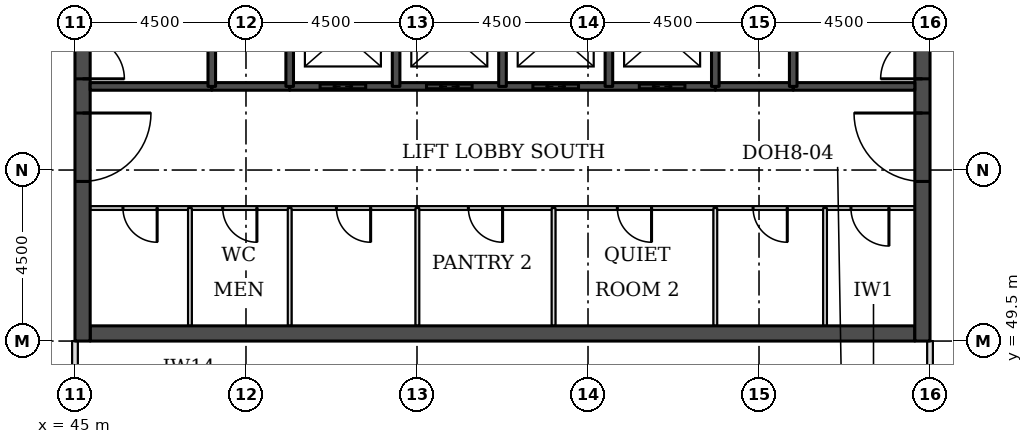
"""IFC4 building model, lengths in metres.
Left out: names, types, materials, properties, quantities, classifications, styles, units other than length and angle.
Written with IfcOpenShell. Run it as: python <this file> out.ifc"""

import sys

from ifc_helpers import new_model, si_unit, direction, frame, frame_2d, origin, place, context, subcontext, project, spatial, rectangle, extrude, element, fill, save


model = new_model("IFC4")
c1 = context("Model", 3, precision=1e-05, world=origin(), true_north=direction((0.0, 1.0)))
c2 = subcontext(c1, "Body", "Model", "MODEL_VIEW")
j1 = project(units=[si_unit("LENGTHUNIT", "METRE"), si_unit("PLANEANGLEUNIT", "RADIAN")], contexts=[c1])
p1 = place(None, origin())
s1 = spatial("IfcSite", under=j1, at=p1, CompositionType="ELEMENT")
p2 = place(p1, origin())
s2 = spatial("IfcBuilding", under=s1, at=p2, CompositionType="ELEMENT")
p3 = place(p2, frame((0.0, 0.0, 203.2)))
s3 = spatial("IfcBuildingStorey", under=s2, at=p3, CompositionType="ELEMENT", Elevation=203.2)
p4 = place(p3, frame((45.4, 49.7, 0.0), z_axis=(0.0, 0.0, 1.0), x_axis=(1.0, 0.0, 0.0)))
e1 = element("IfcWall", 1, at=p4, inside=s3, PredefinedType="SHEAR", context=c2, shape_type="SweptSolid", body=[
    extrude(rectangle(XDim=21.7, YDim=0.4, at=frame_2d((10.85, 0.0))), origin(), (0.0, 0.0, 1.0), 3.7),
])
p5 = place(p3, frame((45.2, 49.5, 0.0), z_axis=(0.0, 0.0, 1.0), x_axis=(0.0, 1.0, 0.0)))
e2 = element("IfcWall", 2, at=p5, inside=s3, PredefinedType="SHEAR", context=c2, shape_type="SweptSolid", body=[
    extrude(rectangle(XDim=22.5, YDim=0.4, at=frame_2d((11.25, 0.0))), origin(), (0.0, 0.0, 1.0), 3.7),
])
p6 = place(p5, frame((4.2, 0.0, 0.0)))
e3 = element("IfcOpeningElement", 3, at=p6, cuts=e2, PredefinedType="OPENING", context=c2, shape_type="SweptSolid", body=[
    extrude(rectangle(XDim=1.8, YDim=2.1, at=frame_2d((0.9, 1.05))), frame((0.0, 0.21, 0.0), z_axis=(0.0, -1.0, 0.0), x_axis=(1.0, 0.0, 0.0)), (0.0, 0.0, 1.0), 0.42),
])
p7 = place(p5, frame((6.9, 0.0, 0.0)))
e4 = element("IfcOpeningElement", 4, at=p7, cuts=e2, PredefinedType="OPENING", context=c2, shape_type="SweptSolid", body=[
    extrude(rectangle(XDim=1.1, YDim=2.1, at=frame_2d((0.55, 1.05))), frame((0.0, 0.21, 0.0), z_axis=(0.0, -1.0, 0.0), x_axis=(1.0, 0.0, 0.0)), (0.0, 0.0, 1.0), 0.42),
])
p8 = place(p5, frame((13.6, 0.0, 0.0)))
e5 = element("IfcOpeningElement", 5, at=p8, cuts=e2, PredefinedType="OPENING", context=c2, shape_type="SweptSolid", body=[
    extrude(rectangle(XDim=1.1, YDim=2.1, at=frame_2d((0.55, 1.05))), frame((0.0, 0.21, 0.0), z_axis=(0.0, -1.0, 0.0), x_axis=(1.0, 0.0, 0.0)), (0.0, 0.0, 1.0), 0.42),
])
p9 = place(p5, frame((16.5, 0.0, 0.0)))
e6 = element("IfcOpeningElement", 6, at=p9, cuts=e2, PredefinedType="OPENING", context=c2, shape_type="SweptSolid", body=[
    extrude(rectangle(XDim=1.8, YDim=2.1, at=frame_2d((0.9, 1.05))), frame((0.0, 0.21, 0.0), z_axis=(0.0, -1.0, 0.0), x_axis=(1.0, 0.0, 0.0)), (0.0, 0.0, 1.0), 0.42),
])
p10 = place(p3, frame((67.3, 49.5, 0.0), z_axis=(0.0, 0.0, 1.0), x_axis=(0.0, 1.0, 0.0)))
e7 = element("IfcWall", 7, at=p10, inside=s3, PredefinedType="SHEAR", context=c2, shape_type="SweptSolid", body=[
    extrude(rectangle(XDim=22.5, YDim=0.4, at=frame_2d((11.25, 0.0))), origin(), (0.0, 0.0, 1.0), 3.7),
])
p11 = place(p10, frame((4.2, 0.0, 0.0)))
e8 = element("IfcOpeningElement", 8, at=p11, cuts=e7, PredefinedType="OPENING", context=c2, shape_type="SweptSolid", body=[
    extrude(rectangle(XDim=1.8, YDim=2.1, at=frame_2d((0.9, 1.05))), frame((0.0, 0.21, 0.0), z_axis=(0.0, -1.0, 0.0), x_axis=(1.0, 0.0, 0.0)), (0.0, 0.0, 1.0), 0.42),
])
p12 = place(p10, frame((6.9, 0.0, 0.0)))
e9 = element("IfcOpeningElement", 9, at=p12, cuts=e7, PredefinedType="OPENING", context=c2, shape_type="SweptSolid", body=[
    extrude(rectangle(XDim=1.1, YDim=2.1, at=frame_2d((0.55, 1.05))), frame((0.0, 0.21, 0.0), z_axis=(0.0, -1.0, 0.0), x_axis=(1.0, 0.0, 0.0)), (0.0, 0.0, 1.0), 0.42),
])
p13 = place(p10, frame((13.6, 0.0, 0.0)))
e10 = element("IfcOpeningElement", 10, at=p13, cuts=e7, PredefinedType="OPENING", context=c2, shape_type="SweptSolid", body=[
    extrude(rectangle(XDim=1.1, YDim=2.1, at=frame_2d((0.55, 1.05))), frame((0.0, 0.21, 0.0), z_axis=(0.0, -1.0, 0.0), x_axis=(1.0, 0.0, 0.0)), (0.0, 0.0, 1.0), 0.42),
])
p14 = place(p10, frame((16.5, 0.0, 0.0)))
e11 = element("IfcOpeningElement", 11, at=p14, cuts=e7, PredefinedType="OPENING", context=c2, shape_type="SweptSolid", body=[
    extrude(rectangle(XDim=1.8, YDim=2.1, at=frame_2d((0.9, 1.05))), frame((0.0, 0.21, 0.0), z_axis=(0.0, -1.0, 0.0), x_axis=(1.0, 0.0, 0.0)), (0.0, 0.0, 1.0), 0.42),
])
p15 = place(p3, frame((67.5, 46.5, 0.0), z_axis=(0.0, 0.0, 1.0), x_axis=(0.0, 1.0, 0.0)))
e12 = element("IfcWall", 12, at=p15, inside=s3, PredefinedType="PARTITIONING", context=c2, shape_type="SweptSolid", body=[
    extrude(rectangle(XDim=3.0, YDim=0.15, at=frame_2d((1.5, 0.0))), origin(), (0.0, 0.0, 1.0), 2.938),
])
p16 = place(p3, frame((45.0, 48.0, 0.0), z_axis=(0.0, 0.0, 1.0), x_axis=(0.0, 1.0, 0.0)))
e13 = element("IfcWall", 13, at=p16, inside=s3, PredefinedType="PARTITIONING", context=c2, shape_type="SweptSolid", body=[
    extrude(rectangle(XDim=1.5, YDim=0.15, at=frame_2d((0.75, 0.0))), origin(), (0.0, 0.0, 1.0), 2.938),
])
p17 = place(p3, frame((45.4, 53.0, 0.0), z_axis=(0.0, 0.0, 1.0), x_axis=(1.0, 0.0, 0.0)))
e14 = element("IfcWall", 14, at=p17, inside=s3, PredefinedType="PARTITIONING", context=c2, shape_type="SweptSolid", body=[
    extrude(rectangle(XDim=21.7, YDim=0.1, at=frame_2d((10.85, 0.0))), origin(), (0.0, 0.0, 1.0), 3.55),
])
p18 = place(p17, frame((20.019, 0.0, 0.0)))
e15 = element("IfcOpeningElement", 15, at=p18, cuts=e14, PredefinedType="OPENING", context=c2, shape_type="SweptSolid", body=[
    extrude(rectangle(XDim=1.0, YDim=2.1, at=frame_2d((0.5, 1.05))), frame((0.0, 0.06, 0.0), z_axis=(0.0, -1.0, 0.0), x_axis=(1.0, 0.0, 0.0)), (0.0, 0.0, 1.0), 0.12),
])
p19 = place(p17, frame((17.444, 0.0, 0.0)))
e16 = element("IfcOpeningElement", 16, at=p19, cuts=e14, PredefinedType="OPENING", context=c2, shape_type="SweptSolid", body=[
    extrude(rectangle(XDim=0.9, YDim=2.1, at=frame_2d((0.45, 1.05))), frame((0.0, 0.06, 0.0), z_axis=(0.0, -1.0, 0.0), x_axis=(1.0, 0.0, 0.0)), (0.0, 0.0, 1.0), 0.12),
])
p20 = place(p17, frame((0.863, 0.0, 0.0)))
e17 = element("IfcOpeningElement", 17, at=p20, cuts=e14, PredefinedType="OPENING", context=c2, shape_type="SweptSolid", body=[
    extrude(rectangle(XDim=0.9, YDim=2.1, at=frame_2d((0.45, 1.05))), frame((0.0, 0.06, 0.0), z_axis=(0.0, -1.0, 0.0), x_axis=(1.0, 0.0, 0.0)), (0.0, 0.0, 1.0), 0.12),
])
p21 = place(p17, frame((3.488, 0.0, 0.0)))
e18 = element("IfcOpeningElement", 18, at=p21, cuts=e14, PredefinedType="OPENING", context=c2, shape_type="SweptSolid", body=[
    extrude(rectangle(XDim=0.9, YDim=2.1, at=frame_2d((0.45, 1.05))), frame((0.0, 0.06, 0.0), z_axis=(0.0, -1.0, 0.0), x_axis=(1.0, 0.0, 0.0)), (0.0, 0.0, 1.0), 0.12),
])
p22 = place(p17, frame((6.48, 0.0, 0.0)))
e19 = element("IfcOpeningElement", 19, at=p22, cuts=e14, PredefinedType="OPENING", context=c2, shape_type="SweptSolid", body=[
    extrude(rectangle(XDim=0.9, YDim=2.1, at=frame_2d((0.45, 1.05))), frame((0.0, 0.06, 0.0), z_axis=(0.0, -1.0, 0.0), x_axis=(1.0, 0.0, 0.0)), (0.0, 0.0, 1.0), 0.12),
])
p23 = place(p17, frame((9.952, 0.0, 0.0)))
e20 = element("IfcOpeningElement", 20, at=p23, cuts=e14, PredefinedType="OPENING", context=c2, shape_type="SweptSolid", body=[
    extrude(rectangle(XDim=0.9, YDim=2.1, at=frame_2d((0.45, 1.05))), frame((0.0, 0.06, 0.0), z_axis=(0.0, -1.0, 0.0), x_axis=(1.0, 0.0, 0.0)), (0.0, 0.0, 1.0), 0.12),
])
p24 = place(p17, frame((13.872, 0.0, 0.0)))
e21 = element("IfcOpeningElement", 21, at=p24, cuts=e14, PredefinedType="OPENING", context=c2, shape_type="SweptSolid", body=[
    extrude(rectangle(XDim=0.9, YDim=2.1, at=frame_2d((0.45, 1.05))), frame((0.0, 0.06, 0.0), z_axis=(0.0, -1.0, 0.0), x_axis=(1.0, 0.0, 0.0)), (0.0, 0.0, 1.0), 0.12),
])
for number, where, z_axis, x_axis in (
    (22, (48.6, 56.2, 0.0), (0.0, 0.0, 1.0), (1.0, 0.0, 0.0)),
    (23, (61.85, 56.2, 0.0), (0.0, 0.0, 1.0), (1.0, 0.0, 0.0)),
):
    element("IfcWall", number, at=place(p3, frame(where, z_axis=z_axis, x_axis=x_axis)), inside=s3, PredefinedType="SOLIDWALL", context=c2, shape_type="SweptSolid", body=[
        extrude(rectangle(XDim=2.05, YDim=0.2, at=frame_2d((1.025, 0.0))), origin(), (0.0, 0.0, 1.0), 3.55),
    ])
p25 = place(p3, frame((45.4, 56.2, 0.0), z_axis=(0.0, 0.0, 1.0), x_axis=(1.0, 0.0, 0.0)))
e24 = element("IfcWall", 24, at=p25, inside=s3, PredefinedType="SOLIDWALL", context=c2, shape_type="SweptSolid", body=[
    extrude(rectangle(XDim=3.2, YDim=0.2, at=frame_2d((1.6, 0.0))), origin(), (0.0, 0.0, 1.0), 3.55),
])
p26 = place(p3, frame((50.65, 56.2, 0.0), z_axis=(0.0, 0.0, 1.0), x_axis=(1.0, 0.0, 0.0)))
e25 = element("IfcWall", 25, at=p26, inside=s3, PredefinedType="SOLIDWALL", context=c2, shape_type="SweptSolid", body=[
    extrude(rectangle(XDim=11.2, YDim=0.2, at=frame_2d((5.6, 0.0))), origin(), (0.0, 0.0, 1.0), 3.55),
])
p27 = place(p26, frame((0.8, 0.0, 0.0)))
e26 = element("IfcOpeningElement", 26, at=p27, cuts=e25, PredefinedType="OPENING", context=c2, shape_type="SweptSolid", body=[
    extrude(rectangle(XDim=1.2, YDim=2.1, at=frame_2d((0.6, 1.05))), frame((0.0, 0.11, 0.0), z_axis=(0.0, -1.0, 0.0), x_axis=(1.0, 0.0, 0.0)), (0.0, 0.0, 1.0), 0.22),
])
p28 = place(p26, frame((3.6, 0.0, 0.0)))
e27 = element("IfcOpeningElement", 27, at=p28, cuts=e25, PredefinedType="OPENING", context=c2, shape_type="SweptSolid", body=[
    extrude(rectangle(XDim=1.2, YDim=2.1, at=frame_2d((0.6, 1.05))), frame((0.0, 0.11, 0.0), z_axis=(0.0, -1.0, 0.0), x_axis=(1.0, 0.0, 0.0)), (0.0, 0.0, 1.0), 0.22),
])
p29 = place(p26, frame((6.4, 0.0, 0.0)))
e28 = element("IfcOpeningElement", 28, at=p29, cuts=e25, PredefinedType="OPENING", context=c2, shape_type="SweptSolid", body=[
    extrude(rectangle(XDim=1.2, YDim=2.1, at=frame_2d((0.6, 1.05))), frame((0.0, 0.11, 0.0), z_axis=(0.0, -1.0, 0.0), x_axis=(1.0, 0.0, 0.0)), (0.0, 0.0, 1.0), 0.22),
])
p30 = place(p26, frame((9.2, 0.0, 0.0)))
e29 = element("IfcOpeningElement", 29, at=p30, cuts=e25, PredefinedType="OPENING", context=c2, shape_type="SweptSolid", body=[
    extrude(rectangle(XDim=1.2, YDim=2.1, at=frame_2d((0.6, 1.05))), frame((0.0, 0.11, 0.0), z_axis=(0.0, -1.0, 0.0), x_axis=(1.0, 0.0, 0.0)), (0.0, 0.0, 1.0), 0.22),
])
p31 = place(p3, frame((63.9, 56.2, 0.0), z_axis=(0.0, 0.0, 1.0), x_axis=(1.0, 0.0, 0.0)))
e30 = element("IfcWall", 30, at=p31, inside=s3, PredefinedType="SOLIDWALL", context=c2, shape_type="SweptSolid", body=[
    extrude(rectangle(XDim=3.2, YDim=0.2, at=frame_2d((1.6, 0.0))), origin(), (0.0, 0.0, 1.0), 3.55),
])
p32 = place(p3, frame((48.025, 49.9, 0.0), z_axis=(0.0, 0.0, 1.0), x_axis=(0.0, 1.0, 0.0)))
e31 = element("IfcWall", 31, at=p32, inside=s3, PredefinedType="PARTITIONING", context=c2, shape_type="SweptSolid", body=[
    extrude(rectangle(XDim=3.1, YDim=0.1, at=frame_2d((1.55, 0.0))), origin(), (0.0, 0.0, 1.0), 3.55),
])
p33 = place(p3, frame((48.6, 56.2, 0.0), z_axis=(0.0, 0.0, 1.0), x_axis=(0.0, 1.0, 0.0)))
e32 = element("IfcWall", 32, at=p33, inside=s3, PredefinedType="SOLIDWALL", context=c2, shape_type="SweptSolid", body=[
    extrude(rectangle(XDim=5.8, YDim=0.2, at=frame_2d((2.9, 0.0))), origin(), (0.0, 0.0, 1.0), 3.55),
])
p34 = place(p3, frame((50.65, 49.9, 0.0), z_axis=(0.0, 0.0, 1.0), x_axis=(0.0, 1.0, 0.0)))
e33 = element("IfcWall", 33, at=p34, inside=s3, PredefinedType="PARTITIONING", context=c2, shape_type="SweptSolid", body=[
    extrude(rectangle(XDim=3.1, YDim=0.1, at=frame_2d((1.55, 0.0))), origin(), (0.0, 0.0, 1.0), 3.55),
])
for number, where, z_axis, x_axis in (
    (34, (50.65, 56.2, 0.0), (0.0, 0.0, 1.0), (0.0, 1.0, 0.0)),
    (35, (53.45, 56.2, 0.0), (0.0, 0.0, 1.0), (0.0, 1.0, 0.0)),
):
    element("IfcWall", number, at=place(p3, frame(where, z_axis=z_axis, x_axis=x_axis)), inside=s3, PredefinedType="SOLIDWALL", context=c2, shape_type="SweptSolid", body=[
        extrude(rectangle(XDim=2.8, YDim=0.2, at=frame_2d((1.4, 0.0))), origin(), (0.0, 0.0, 1.0), 3.55),
    ])
p35 = place(p3, frame((54.01, 49.9, 0.0), z_axis=(0.0, 0.0, 1.0), x_axis=(0.0, 1.0, 0.0)))
e36 = element("IfcWall", 36, at=p35, inside=s3, PredefinedType="PARTITIONING", context=c2, shape_type="SweptSolid", body=[
    extrude(rectangle(XDim=3.1, YDim=0.1, at=frame_2d((1.55, 0.0))), origin(), (0.0, 0.0, 1.0), 3.55),
])
p36 = place(p3, frame((56.25, 56.2, 0.0), z_axis=(0.0, 0.0, 1.0), x_axis=(0.0, 1.0, 0.0)))
e37 = element("IfcWall", 37, at=p36, inside=s3, PredefinedType="SOLIDWALL", context=c2, shape_type="SweptSolid", body=[
    extrude(rectangle(XDim=2.8, YDim=0.2, at=frame_2d((1.4, 0.0))), origin(), (0.0, 0.0, 1.0), 3.55),
])
p37 = place(p3, frame((57.594, 49.9, 0.0), z_axis=(0.0, 0.0, 1.0), x_axis=(0.0, 1.0, 0.0)))
e38 = element("IfcWall", 38, at=p37, inside=s3, PredefinedType="PARTITIONING", context=c2, shape_type="SweptSolid", body=[
    extrude(rectangle(XDim=3.1, YDim=0.1, at=frame_2d((1.55, 0.0))), origin(), (0.0, 0.0, 1.0), 3.55),
])
p38 = place(p3, frame((59.05, 56.2, 0.0), z_axis=(0.0, 0.0, 1.0), x_axis=(0.0, 1.0, 0.0)))
e39 = element("IfcWall", 39, at=p38, inside=s3, PredefinedType="SOLIDWALL", context=c2, shape_type="SweptSolid", body=[
    extrude(rectangle(XDim=2.8, YDim=0.2, at=frame_2d((1.4, 0.0))), origin(), (0.0, 0.0, 1.0), 3.55),
])
p39 = place(p3, frame((61.85, 49.9, 0.0), z_axis=(0.0, 0.0, 1.0), x_axis=(0.0, 1.0, 0.0)))
e40 = element("IfcWall", 40, at=p39, inside=s3, PredefinedType="PARTITIONING", context=c2, shape_type="SweptSolid", body=[
    extrude(rectangle(XDim=3.1, YDim=0.1, at=frame_2d((1.55, 0.0))), origin(), (0.0, 0.0, 1.0), 3.55),
])
p40 = place(p3, frame((61.85, 56.2, 0.0), z_axis=(0.0, 0.0, 1.0), x_axis=(0.0, 1.0, 0.0)))
e41 = element("IfcWall", 41, at=p40, inside=s3, PredefinedType="SOLIDWALL", context=c2, shape_type="SweptSolid", body=[
    extrude(rectangle(XDim=2.8, YDim=0.2, at=frame_2d((1.4, 0.0))), origin(), (0.0, 0.0, 1.0), 3.55),
])
p41 = place(p3, frame((63.9, 56.2, 0.0), z_axis=(0.0, 0.0, 1.0), x_axis=(0.0, 1.0, 0.0)))
e42 = element("IfcWall", 42, at=p41, inside=s3, PredefinedType="SOLIDWALL", context=c2, shape_type="SweptSolid", body=[
    extrude(rectangle(XDim=5.8, YDim=0.2, at=frame_2d((2.9, 0.0))), origin(), (0.0, 0.0, 1.0), 3.55),
])
p42 = place(p3, frame((64.738, 49.9, 0.0), z_axis=(0.0, 0.0, 1.0), x_axis=(0.0, 1.0, 0.0)))
e43 = element("IfcWall", 43, at=p42, inside=s3, PredefinedType="PARTITIONING", context=c2, shape_type="SweptSolid", body=[
    extrude(rectangle(XDim=3.1, YDim=0.1, at=frame_2d((1.55, 0.0))), origin(), (0.0, 0.0, 1.0), 3.55),
])
p43 = place(p27, origin())
e44 = element("IfcDoor", 44, at=p43, inside=s3, OperationType="DOUBLE_DOOR_SLIDING", PredefinedType="DOOR", context=c2, shape_type="SweptSolid", body=[
    extrude(rectangle(XDim=1.2, YDim=2.1, at=frame_2d((0.6, 1.05))), frame((0.0, 0.025, 0.0), z_axis=(0.0, -1.0, 0.0), x_axis=(1.0, 0.0, 0.0)), (0.0, 0.0, 1.0), 0.05),
])
fill(e26, e44)
p44 = place(p28, origin())
e45 = element("IfcDoor", 45, at=p44, inside=s3, OperationType="DOUBLE_DOOR_SLIDING", PredefinedType="DOOR", context=c2, shape_type="SweptSolid", body=[
    extrude(rectangle(XDim=1.2, YDim=2.1, at=frame_2d((0.6, 1.05))), frame((0.0, 0.025, 0.0), z_axis=(0.0, -1.0, 0.0), x_axis=(1.0, 0.0, 0.0)), (0.0, 0.0, 1.0), 0.05),
])
fill(e27, e45)
p45 = place(p29, origin())
e46 = element("IfcDoor", 46, at=p45, inside=s3, OperationType="DOUBLE_DOOR_SLIDING", PredefinedType="DOOR", context=c2, shape_type="SweptSolid", body=[
    extrude(rectangle(XDim=1.2, YDim=2.1, at=frame_2d((0.6, 1.05))), frame((0.0, 0.025, 0.0), z_axis=(0.0, -1.0, 0.0), x_axis=(1.0, 0.0, 0.0)), (0.0, 0.0, 1.0), 0.05),
])
fill(e28, e46)
p46 = place(p30, origin())
e47 = element("IfcDoor", 47, at=p46, inside=s3, OperationType="DOUBLE_DOOR_SLIDING", PredefinedType="DOOR", context=c2, shape_type="SweptSolid", body=[
    extrude(rectangle(XDim=1.2, YDim=2.1, at=frame_2d((0.6, 1.05))), frame((0.0, 0.025, 0.0), z_axis=(0.0, -1.0, 0.0), x_axis=(1.0, 0.0, 0.0)), (0.0, 0.0, 1.0), 0.05),
])
fill(e29, e47)
p47 = place(p6, frame((1.8, 0.0, 0.0), z_axis=(0.0, 0.0, 1.0), x_axis=(-1.0, 0.0, 0.0)))
e48 = element("IfcDoor", 48, at=p47, inside=s3, OperationType="SINGLE_SWING_LEFT", PredefinedType="DOOR", context=c2, shape_type="SweptSolid", body=[
    extrude(rectangle(XDim=1.8, YDim=2.1, at=frame_2d((0.9, 1.05))), frame((0.0, 0.025, 0.0), z_axis=(0.0, -1.0, 0.0), x_axis=(1.0, 0.0, 0.0)), (0.0, 0.0, 1.0), 0.05),
])
fill(e3, e48)
p48 = place(p7, frame((1.1, 0.0, 0.0), z_axis=(0.0, 0.0, 1.0), x_axis=(-1.0, 0.0, 0.0)))
e49 = element("IfcDoor", 49, at=p48, inside=s3, OperationType="SINGLE_SWING_RIGHT", PredefinedType="DOOR", context=c2, shape_type="SweptSolid", body=[
    extrude(rectangle(XDim=1.1, YDim=2.1, at=frame_2d((0.55, 1.05))), frame((0.0, 0.025, 0.0), z_axis=(0.0, -1.0, 0.0), x_axis=(1.0, 0.0, 0.0)), (0.0, 0.0, 1.0), 0.05),
])
fill(e4, e49)
p49 = place(p11, origin())
e50 = element("IfcDoor", 50, at=p49, inside=s3, OperationType="SINGLE_SWING_RIGHT", PredefinedType="DOOR", context=c2, shape_type="SweptSolid", body=[
    extrude(rectangle(XDim=1.8, YDim=2.1, at=frame_2d((0.9, 1.05))), frame((0.0, 0.025, 0.0), z_axis=(0.0, -1.0, 0.0), x_axis=(1.0, 0.0, 0.0)), (0.0, 0.0, 1.0), 0.05),
])
fill(e8, e50)
p50 = place(p12, origin())
e51 = element("IfcDoor", 51, at=p50, inside=s3, OperationType="SINGLE_SWING_LEFT", PredefinedType="DOOR", context=c2, shape_type="SweptSolid", body=[
    extrude(rectangle(XDim=1.1, YDim=2.1, at=frame_2d((0.55, 1.05))), frame((0.0, 0.025, 0.0), z_axis=(0.0, -1.0, 0.0), x_axis=(1.0, 0.0, 0.0)), (0.0, 0.0, 1.0), 0.05),
])
fill(e9, e51)
p51 = place(p18, frame((1.0, 0.0, 0.0), z_axis=(0.0, 0.0, 1.0), x_axis=(-1.0, 0.0, 0.0)))
e52 = element("IfcDoor", 52, at=p51, inside=s3, OperationType="SINGLE_SWING_LEFT", PredefinedType="DOOR", context=c2, shape_type="SweptSolid", body=[
    extrude(rectangle(XDim=1.0, YDim=2.1, at=frame_2d((0.5, 1.05))), frame((0.0, 0.025, 0.0), z_axis=(0.0, -1.0, 0.0), x_axis=(1.0, 0.0, 0.0)), (0.0, 0.0, 1.0), 0.05),
])
fill(e15, e52)
p52 = place(p19, frame((0.9, 0.0, 0.0), z_axis=(0.0, 0.0, 1.0), x_axis=(-1.0, 0.0, 0.0)))
e53 = element("IfcDoor", 53, at=p52, inside=s3, OperationType="SINGLE_SWING_LEFT", PredefinedType="DOOR", context=c2, shape_type="SweptSolid", body=[
    extrude(rectangle(XDim=0.9, YDim=2.1, at=frame_2d((0.45, 1.05))), frame((0.0, 0.025, 0.0), z_axis=(0.0, -1.0, 0.0), x_axis=(1.0, 0.0, 0.0)), (0.0, 0.0, 1.0), 0.05),
])
fill(e16, e53)
p53 = place(p20, frame((0.9, 0.0, 0.0), z_axis=(0.0, 0.0, 1.0), x_axis=(-1.0, 0.0, 0.0)))
e54 = element("IfcDoor", 54, at=p53, inside=s3, OperationType="SINGLE_SWING_LEFT", PredefinedType="DOOR", context=c2, shape_type="SweptSolid", body=[
    extrude(rectangle(XDim=0.9, YDim=2.1, at=frame_2d((0.45, 1.05))), frame((0.0, 0.025, 0.0), z_axis=(0.0, -1.0, 0.0), x_axis=(1.0, 0.0, 0.0)), (0.0, 0.0, 1.0), 0.05),
])
fill(e17, e54)
p54 = place(p21, frame((0.9, 0.0, 0.0), z_axis=(0.0, 0.0, 1.0), x_axis=(-1.0, 0.0, 0.0)))
e55 = element("IfcDoor", 55, at=p54, inside=s3, OperationType="SINGLE_SWING_LEFT", PredefinedType="DOOR", context=c2, shape_type="SweptSolid", body=[
    extrude(rectangle(XDim=0.9, YDim=2.1, at=frame_2d((0.45, 1.05))), frame((0.0, 0.025, 0.0), z_axis=(0.0, -1.0, 0.0), x_axis=(1.0, 0.0, 0.0)), (0.0, 0.0, 1.0), 0.05),
])
fill(e18, e55)
p55 = place(p22, frame((0.9, 0.0, 0.0), z_axis=(0.0, 0.0, 1.0), x_axis=(-1.0, 0.0, 0.0)))
e56 = element("IfcDoor", 56, at=p55, inside=s3, OperationType="SINGLE_SWING_LEFT", PredefinedType="DOOR", context=c2, shape_type="SweptSolid", body=[
    extrude(rectangle(XDim=0.9, YDim=2.1, at=frame_2d((0.45, 1.05))), frame((0.0, 0.025, 0.0), z_axis=(0.0, -1.0, 0.0), x_axis=(1.0, 0.0, 0.0)), (0.0, 0.0, 1.0), 0.05),
])
fill(e19, e56)
p56 = place(p23, frame((0.9, 0.0, 0.0), z_axis=(0.0, 0.0, 1.0), x_axis=(-1.0, 0.0, 0.0)))
e57 = element("IfcDoor", 57, at=p56, inside=s3, OperationType="SINGLE_SWING_LEFT", PredefinedType="DOOR", context=c2, shape_type="SweptSolid", body=[
    extrude(rectangle(XDim=0.9, YDim=2.1, at=frame_2d((0.45, 1.05))), frame((0.0, 0.025, 0.0), z_axis=(0.0, -1.0, 0.0), x_axis=(1.0, 0.0, 0.0)), (0.0, 0.0, 1.0), 0.05),
])
fill(e20, e57)
p57 = place(p24, frame((0.9, 0.0, 0.0), z_axis=(0.0, 0.0, 1.0), x_axis=(-1.0, 0.0, 0.0)))
e58 = element("IfcDoor", 58, at=p57, inside=s3, OperationType="SINGLE_SWING_LEFT", PredefinedType="DOOR", context=c2, shape_type="SweptSolid", body=[
    extrude(rectangle(XDim=0.9, YDim=2.1, at=frame_2d((0.45, 1.05))), frame((0.0, 0.025, 0.0), z_axis=(0.0, -1.0, 0.0), x_axis=(1.0, 0.0, 0.0)), (0.0, 0.0, 1.0), 0.05),
])
fill(e21, e58)
save(model, sys.argv[1])
